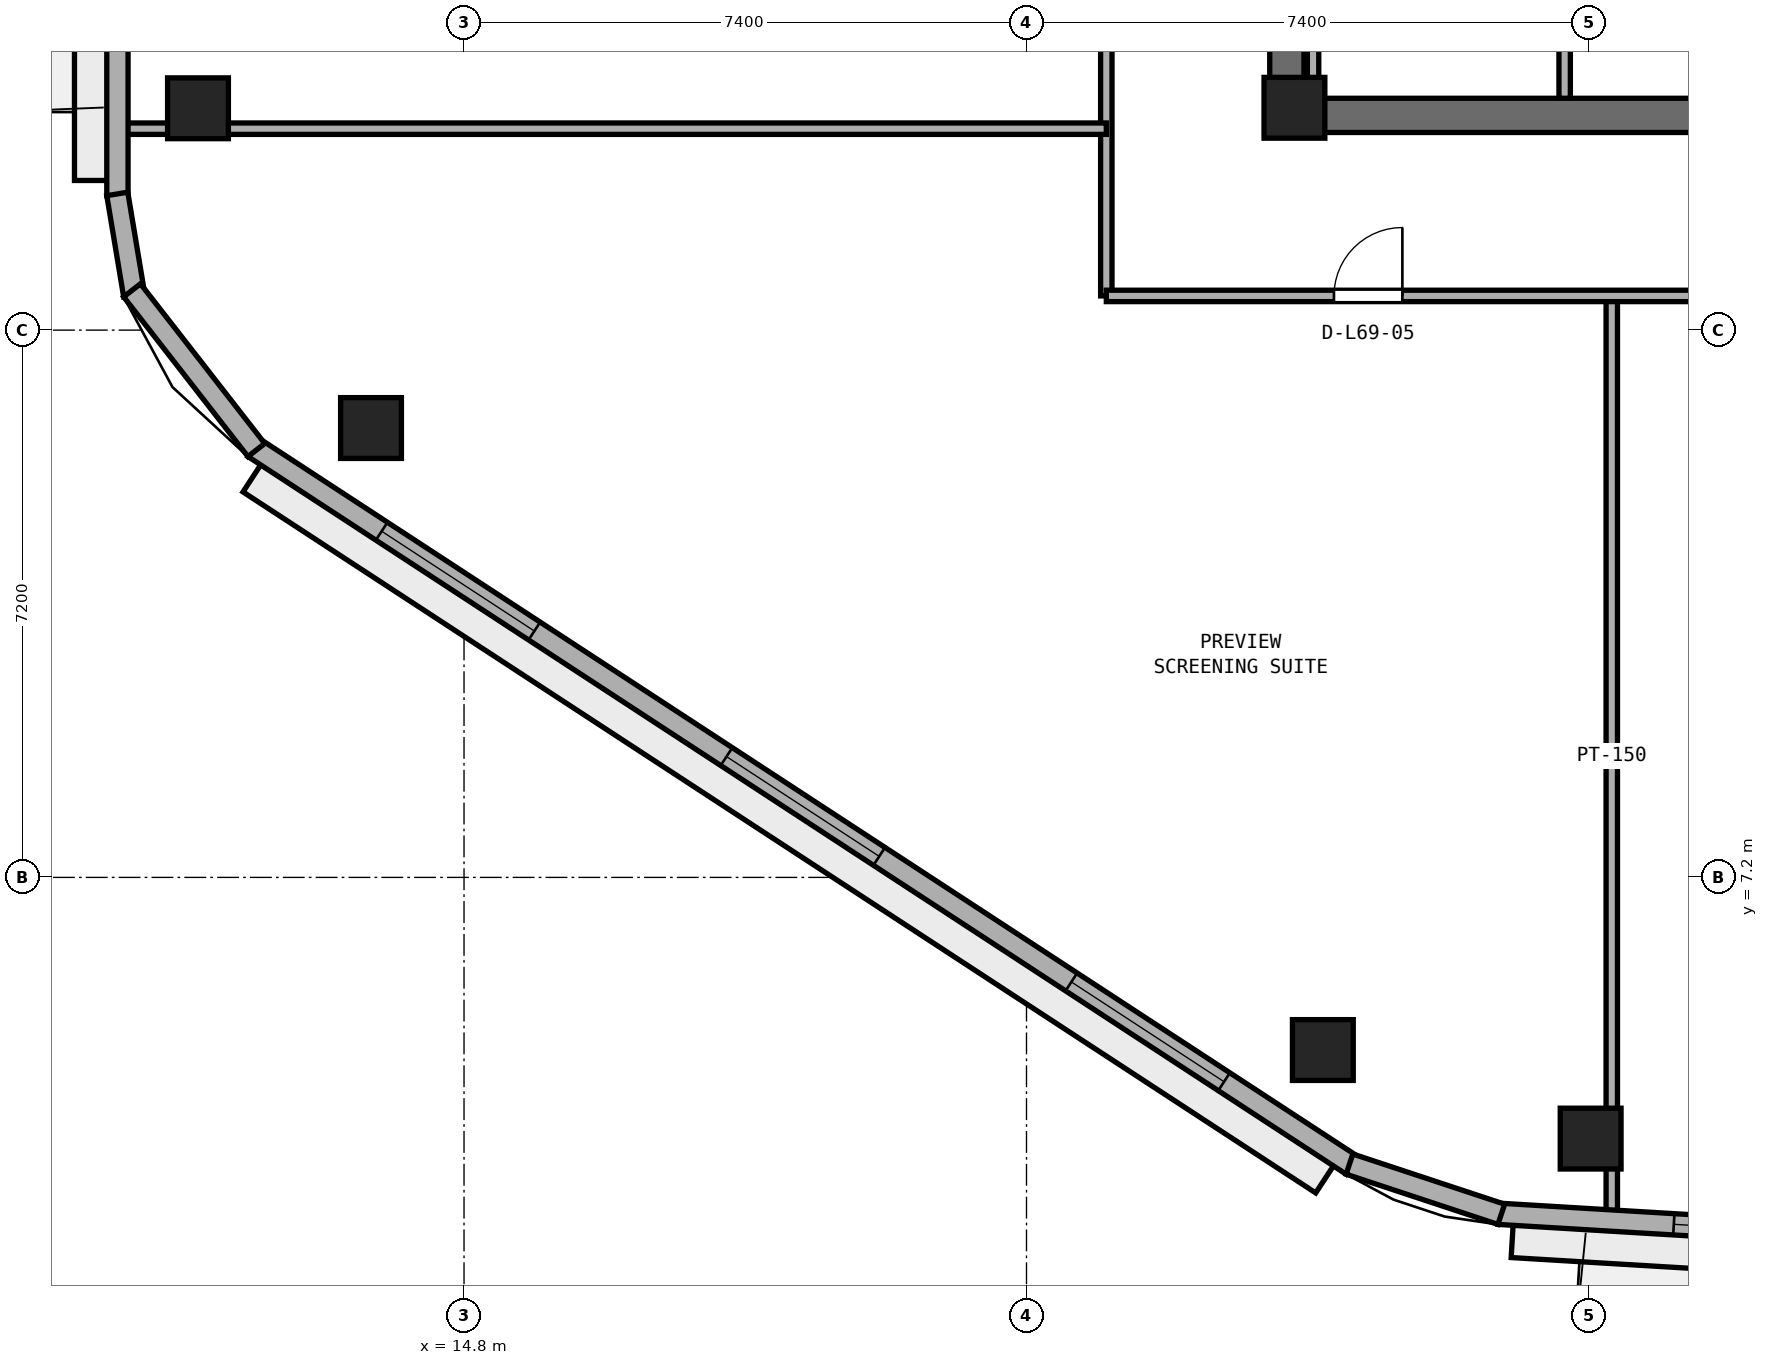
"""IFC4 building model, lengths in metres.
Left out: names, types, materials, properties, quantities, classifications, styles, units other than length and angle.
Written with IfcOpenShell. Run it as: python <this file> out.ifc"""

import sys

from ifc_helpers import new_model, si_unit, direction, frame, frame_2d, origin, origin_2d, place, context, subcontext, project, spatial, rectangle, extrude, element, fill, save


model = new_model("IFC4")
c1 = context("Model", 3, precision=1e-05, world=origin(), true_north=direction((0.0, 1.0)))
c2 = subcontext(c1, "Body", "Model", "MODEL_VIEW")
j1 = project(units=[si_unit("LENGTHUNIT", "METRE"), si_unit("PLANEANGLEUNIT", "RADIAN")], contexts=[c1])
p1 = place(None, origin())
s1 = spatial("IfcSite", under=j1, at=p1, CompositionType="ELEMENT")
p2 = place(p1, origin())
s2 = spatial("IfcBuilding", under=s1, at=p2, CompositionType="ELEMENT")
p3 = place(p2, frame((0.0, 0.0, 270.6)))
s3 = spatial("IfcBuildingStorey", under=s2, at=p3, CompositionType="ELEMENT", Elevation=270.6)
p4 = place(p3, frame((25.4, 17.225, 0.0), z_axis=(0.0, 0.0, 1.0), x_axis=(1.0, 0.0, 0.0)))
e1 = element("IfcWall", 1, at=p4, inside=s3, PredefinedType="SHEAR", context=c2, shape_type="SweptSolid", body=[
    extrude(rectangle(XDim=23.2, YDim=0.45, at=frame_2d((11.6, 0.0))), origin(), (0.0, 0.0, 1.0), 3.54),
])
p5 = place(p3, frame((25.625, 17.45, 0.0), z_axis=(0.0, 0.0, 1.0), x_axis=(0.0, 1.0, 0.0)))
e2 = element("IfcWall", 2, at=p5, inside=s3, PredefinedType="SHEAR", context=c2, shape_type="SweptSolid", body=[
    extrude(rectangle(XDim=15.5, YDim=0.45, at=frame_2d((7.75, 0.0))), origin(), (0.0, 0.0, 1.0), 3.54),
])
p6 = place(p5, frame((7.0, 0.0, 0.0)))
e3 = element("IfcOpeningElement", 3, at=p6, cuts=e2, PredefinedType="OPENING", context=c2, shape_type="SweptSolid", body=[
    extrude(rectangle(XDim=1.5, YDim=2.15, at=frame_2d((0.75, 1.075))), frame((0.0, 0.235, 0.0), z_axis=(0.0, -1.0, 0.0), x_axis=(1.0, 0.0, 0.0)), (0.0, 0.0, 1.0), 0.47),
])
p7 = place(p3, frame((25.725, 17.325, 0.0), z_axis=(0.0, 0.0, 1.0), x_axis=(1.0, 0.0, 0.0)))
e4 = element("IfcColumn", 4, at=p7, inside=s3, PredefinedType="PILASTER", context=c2, shape_type="SweptSolid", body=[
    extrude(rectangle(XDim=0.8, YDim=0.8, at=origin_2d()), origin(), (0.0, 0.0, 1.0), 3.8),
])
for number, where, z_axis, x_axis in (
    (5, (29.622, 3.764, 0.0), (0.0, 0.0, 1.0), (1.0, 0.0, 0.0)),
    (6, (11.3, 17.319, 0.0), (0.0, 0.0, 1.0), (1.0, 0.0, 0.0)),
    (7, (13.576, 13.112, 0.0), (0.0, 0.0, 1.0), (1.0, 0.0, 0.0)),
    (8, (26.099, 4.929, 0.0), (0.0, 0.0, 1.0), (1.0, 0.0, 0.0)),
):
    element("IfcColumn", number, at=place(p3, frame(where, z_axis=z_axis, x_axis=x_axis)), inside=s3, PredefinedType="COLUMN", context=c2, shape_type="SweptSolid", body=[
        extrude(rectangle(XDim=0.8, YDim=0.8, at=origin_2d()), origin(), (0.0, 0.0, 1.0), 3.8),
    ])
p8 = place(p3, frame((25.97, 17.45, 0.0), z_axis=(0.0, 0.0, 1.0), x_axis=(0.0, 1.0, 0.0)))
e9 = element("IfcWall", 9, at=p8, inside=s3, PredefinedType="PARTITIONING", context=c2, shape_type="SweptSolid", body=[
    extrude(rectangle(XDim=2.3, YDim=0.15, at=frame_2d((1.15, 0.0))), origin(), (0.0, 0.0, 1.0), 2.64),
])
p9 = place(p3, frame((29.28, 17.45, 0.0), z_axis=(0.0, 0.0, 1.0), x_axis=(0.0, 1.0, 0.0)))
e10 = element("IfcWall", 10, at=p9, inside=s3, PredefinedType="PARTITIONING", context=c2, shape_type="SweptSolid", body=[
    extrude(rectangle(XDim=2.3, YDim=0.15, at=frame_2d((1.15, 0.0))), origin(), (0.0, 0.0, 1.0), 3.54),
])
p10 = place(p3, frame((29.9, 2.75, 0.0), z_axis=(0.0, 0.0, 1.0), x_axis=(0.0, 1.0, 0.0)))
e11 = element("IfcWall", 11, at=p10, inside=s3, PredefinedType="PARTITIONING", context=c2, shape_type="SweptSolid", body=[
    extrude(rectangle(XDim=12.1, YDim=0.15, at=frame_2d((6.05, 0.0))), origin(), (0.0, 0.0, 1.0), 3.54),
])
p11 = place(p3, frame((23.25, 14.85, 0.0), z_axis=(0.0, 0.0, 1.0), x_axis=(0.0, 1.0, 0.0)))
e12 = element("IfcWall", 12, at=p11, inside=s3, PredefinedType="PARTITIONING", context=c2, shape_type="SweptSolid", body=[
    extrude(rectangle(XDim=20.7, YDim=0.15, at=frame_2d((10.35, 0.0))), origin(), (0.0, 0.0, 1.0), 3.54),
])
p12 = place(p11, frame((9.9, 0.0, 0.0)))
e13 = element("IfcOpeningElement", 13, at=p12, cuts=e12, PredefinedType="OPENING", context=c2, shape_type="SweptSolid", body=[
    extrude(rectangle(XDim=0.9, YDim=2.1, at=frame_2d((0.45, 1.05))), frame((0.0, 0.085, 0.0), z_axis=(0.0, -1.0, 0.0), x_axis=(1.0, 0.0, 0.0)), (0.0, 0.0, 1.0), 0.17),
])
p13 = place(p3, frame((23.25, 14.85, 0.0), z_axis=(0.0, 0.0, 1.0), x_axis=(1.0, 0.0, 0.0)))
e14 = element("IfcWall", 14, at=p13, inside=s3, PredefinedType="PARTITIONING", context=c2, shape_type="SweptSolid", body=[
    extrude(rectangle(XDim=25.35, YDim=0.15, at=frame_2d((12.675, 0.0))), origin(), (0.0, 0.0, 1.0), 3.54),
])
p14 = place(p13, frame((2.995, 0.0, 0.0)))
e15 = element("IfcOpeningElement", 15, at=p14, cuts=e14, PredefinedType="OPENING", context=c2, shape_type="SweptSolid", body=[
    extrude(rectangle(XDim=0.9, YDim=2.1, at=frame_2d((0.45, 1.05))), frame((0.0, 0.085, 0.0), z_axis=(0.0, -1.0, 0.0), x_axis=(1.0, 0.0, 0.0)), (0.0, 0.0, 1.0), 0.17),
])
p15 = place(p13, frame((11.95, 0.0, 0.0)))
e16 = element("IfcOpeningElement", 16, at=p15, cuts=e14, PredefinedType="OPENING", context=c2, shape_type="SweptSolid", body=[
    extrude(rectangle(XDim=0.9, YDim=2.1, at=frame_2d((0.45, 1.05))), frame((0.0, 0.085, 0.0), z_axis=(0.0, -1.0, 0.0), x_axis=(1.0, 0.0, 0.0)), (0.0, 0.0, 1.0), 0.17),
])
p16 = place(p13, frame((21.18, 0.0, 0.0)))
e17 = element("IfcOpeningElement", 17, at=p16, cuts=e14, PredefinedType="OPENING", context=c2, shape_type="SweptSolid", body=[
    extrude(rectangle(XDim=0.9, YDim=2.1, at=frame_2d((0.45, 1.05))), frame((0.0, 0.085, 0.0), z_axis=(0.0, -1.0, 0.0), x_axis=(1.0, 0.0, 0.0)), (0.0, 0.0, 1.0), 0.17),
])
p17 = place(p3, frame((10.305, 17.05, 0.0), z_axis=(0.0, 0.0, 1.0), x_axis=(1.0, 0.0, 0.0)))
e18 = element("IfcWall", 18, at=p17, inside=s3, PredefinedType="PARTITIONING", context=c2, shape_type="SweptSolid", body=[
    extrude(rectangle(XDim=12.945, YDim=0.15, at=frame_2d((6.473, 0.0))), origin(), (0.0, 0.0, 1.0), 2.19),
])
p18 = place(p3, frame((28.411, 2.774, 0.0), z_axis=(0.0, 0.0, 1.0), x_axis=(0.998203068368, -0.059921901676, 0.0)))
e19 = element("IfcWall", 19, at=p18, inside=s3, PredefinedType="STANDARD", context=c2, shape_type="SweptSolid", body=[
    extrude(rectangle(XDim=19.06, YDim=0.28, at=frame_2d((9.53, 0.0))), origin(), (0.0, 0.0, 1.0), 3.54),
])
p19 = place(p18, frame((8.98, 0.0, 0.0)))
e20 = element("IfcOpeningElement", 20, at=p19, cuts=e19, PredefinedType="OPENING", context=c2, shape_type="SweptSolid", body=[
    extrude(rectangle(XDim=1.1, YDim=2.2, at=frame_2d((0.55, 1.1))), frame((0.0, 0.15, 0.0), z_axis=(0.0, -1.0, 0.0), x_axis=(1.0, 0.0, 0.0)), (0.0, 0.0, 1.0), 0.3),
])
p20 = place(p18, frame((2.31, 0.0, 0.9)))
e21 = element("IfcOpeningElement", 21, at=p20, cuts=e19, PredefinedType="OPENING", context=c2, shape_type="SweptSolid", body=[
    extrude(rectangle(XDim=2.4, YDim=1.75, at=frame_2d((1.2, 0.875))), frame((0.0, 0.15, 0.0), z_axis=(0.0, -1.0, 0.0), x_axis=(1.0, 0.0, 0.0)), (0.0, 0.0, 1.0), 0.3),
])
p21 = place(p18, frame((14.35, 0.0, 0.9)))
e22 = element("IfcOpeningElement", 22, at=p21, cuts=e19, PredefinedType="OPENING", context=c2, shape_type="SweptSolid", body=[
    extrude(rectangle(XDim=2.4, YDim=1.75, at=frame_2d((1.2, 0.875))), frame((0.0, 0.15, 0.0), z_axis=(0.0, -1.0, 0.0), x_axis=(1.0, 0.0, 0.0)), (0.0, 0.0, 1.0), 0.3),
])
p22 = place(p3, frame((10.24, 33.425, 0.0), z_axis=(0.0, 0.0, 1.0), x_axis=(0.0, -1.0, 0.0)))
e23 = element("IfcWall", 23, at=p22, inside=s3, PredefinedType="STANDARD", context=c2, shape_type="SweptSolid", body=[
    extrude(rectangle(XDim=17.257, YDim=0.28, at=frame_2d((8.628, 0.0))), origin(), (0.0, 0.0, 1.0), 3.54),
])
p23 = place(p22, frame((8.078, 0.0, 0.0)))
e24 = element("IfcOpeningElement", 24, at=p23, cuts=e23, PredefinedType="OPENING", context=c2, shape_type="SweptSolid", body=[
    extrude(rectangle(XDim=1.1, YDim=2.2, at=frame_2d((0.55, 1.1))), frame((0.0, 0.15, 0.0), z_axis=(0.0, -1.0, 0.0), x_axis=(1.0, 0.0, 0.0)), (0.0, 0.0, 1.0), 0.3),
])
p24 = place(p22, frame((2.01, 0.0, 0.9)))
e25 = element("IfcOpeningElement", 25, at=p24, cuts=e23, PredefinedType="OPENING", context=c2, shape_type="SweptSolid", body=[
    extrude(rectangle(XDim=2.4, YDim=1.75, at=frame_2d((1.2, 0.875))), frame((0.0, 0.15, 0.0), z_axis=(0.0, -1.0, 0.0), x_axis=(1.0, 0.0, 0.0)), (0.0, 0.0, 1.0), 0.3),
])
p25 = place(p22, frame((12.847, 0.0, 0.9)))
e26 = element("IfcOpeningElement", 26, at=p25, cuts=e23, PredefinedType="OPENING", context=c2, shape_type="SweptSolid", body=[
    extrude(rectangle(XDim=2.4, YDim=1.75, at=frame_2d((1.2, 0.875))), frame((0.0, 0.15, 0.0), z_axis=(0.0, -1.0, 0.0), x_axis=(1.0, 0.0, 0.0)), (0.0, 0.0, 1.0), 0.3),
])
p26 = place(p3, frame((12.034, 12.854, 0.0), z_axis=(0.0, 0.0, 1.0), x_axis=(0.837118352984, -0.547021812269, 0.0)))
e27 = element("IfcWall", 27, at=p26, inside=s3, PredefinedType="STANDARD", context=c2, shape_type="SweptSolid", body=[
    extrude(rectangle(XDim=17.259, YDim=0.28, at=frame_2d((8.63, 0.0))), origin(), (0.0, 0.0, 1.0), 3.54),
])
p27 = place(p26, frame((2.01, 0.0, 0.9)))
e28 = element("IfcOpeningElement", 28, at=p27, cuts=e27, PredefinedType="OPENING", context=c2, shape_type="SweptSolid", body=[
    extrude(rectangle(XDim=2.4, YDim=1.75, at=frame_2d((1.2, 0.875))), frame((0.0, 0.15, 0.0), z_axis=(0.0, -1.0, 0.0), x_axis=(1.0, 0.0, 0.0)), (0.0, 0.0, 1.0), 0.3),
])
p28 = place(p26, frame((7.43, 0.0, 0.9)))
e29 = element("IfcOpeningElement", 29, at=p28, cuts=e27, PredefinedType="OPENING", context=c2, shape_type="SweptSolid", body=[
    extrude(rectangle(XDim=2.4, YDim=1.75, at=frame_2d((1.2, 0.875))), frame((0.0, 0.15, 0.0), z_axis=(0.0, -1.0, 0.0), x_axis=(1.0, 0.0, 0.0)), (0.0, 0.0, 1.0), 0.3),
])
p29 = place(p26, frame((12.849, 0.0, 0.9)))
e30 = element("IfcOpeningElement", 30, at=p29, cuts=e27, PredefinedType="OPENING", context=c2, shape_type="SweptSolid", body=[
    extrude(rectangle(XDim=2.4, YDim=1.75, at=frame_2d((1.2, 0.875))), frame((0.0, 0.15, 0.0), z_axis=(0.0, -1.0, 0.0), x_axis=(1.0, 0.0, 0.0)), (0.0, 0.0, 1.0), 0.3),
])
p30 = place(p3, frame((10.238, 16.192, 0.0), z_axis=(0.0, 0.0, 1.0), x_axis=(0.164604311367, -0.986359681191, 0.0)))
e31 = element("IfcWall", 31, at=p30, inside=s3, PredefinedType="STANDARD", context=c2, shape_type="SweptSolid", body=[
    extrude(rectangle(XDim=1.35, YDim=0.28, at=frame_2d((0.675, 0.0))), origin(), (0.0, 0.0, 1.0), 3.54),
])
p31 = place(p3, frame((10.433, 14.923, 0.0), z_axis=(0.0, 0.0, 1.0), x_axis=(0.614181852676, -0.78916452774, 0.0)))
e32 = element("IfcWall", 32, at=p31, inside=s3, PredefinedType="STANDARD", context=c2, shape_type="SweptSolid", body=[
    extrude(rectangle(XDim=2.662, YDim=0.28, at=frame_2d((1.331, 0.0))), origin(), (0.0, 0.0, 1.0), 3.54),
])
p32 = place(p3, frame((26.449, 3.428, 0.0), z_axis=(0.0, 0.0, 1.0), x_axis=(0.949435039229, -0.313963542923, 0.0)))
e33 = element("IfcWall", 33, at=p32, inside=s3, PredefinedType="STANDARD", context=c2, shape_type="SweptSolid", body=[
    extrude(rectangle(XDim=2.104, YDim=0.28, at=frame_2d((1.052, 0.0))), origin(), (0.0, 0.0, 1.0), 3.54),
])
p33 = place(p14, origin())
e34 = element("IfcDoor", 34, at=p33, inside=s3, OperationType="SINGLE_SWING_RIGHT", PredefinedType="DOOR", context=c2, shape_type="SweptSolid", body=[
    extrude(rectangle(XDim=0.9, YDim=2.1, at=frame_2d((0.45, 1.05))), frame((0.0, 0.025, 0.0), z_axis=(0.0, -1.0, 0.0), x_axis=(1.0, 0.0, 0.0)), (0.0, 0.0, 1.0), 0.05),
])
fill(e15, e34)
p34 = place(p20, origin())
e35 = element("IfcWindow", 35, at=p34, inside=s3, PartitioningType="SINGLE_PANEL", PredefinedType="WINDOW", context=c2, shape_type="SweptSolid", body=[
    extrude(rectangle(XDim=2.4, YDim=1.75, at=frame_2d((1.2, 0.875))), frame((0.0, 0.03, 0.0), z_axis=(0.0, -1.0, 0.0), x_axis=(1.0, 0.0, 0.0)), (0.0, 0.0, 1.0), 0.06),
])
fill(e21, e35)
p35 = place(p27, origin())
e36 = element("IfcWindow", 36, at=p35, inside=s3, PartitioningType="SINGLE_PANEL", PredefinedType="WINDOW", context=c2, shape_type="SweptSolid", body=[
    extrude(rectangle(XDim=2.4, YDim=1.75, at=frame_2d((1.2, 0.875))), frame((0.0, 0.03, 0.0), z_axis=(0.0, -1.0, 0.0), x_axis=(1.0, 0.0, 0.0)), (0.0, 0.0, 1.0), 0.06),
])
fill(e28, e36)
p36 = place(p28, origin())
e37 = element("IfcWindow", 37, at=p36, inside=s3, PartitioningType="SINGLE_PANEL", PredefinedType="WINDOW", context=c2, shape_type="SweptSolid", body=[
    extrude(rectangle(XDim=2.4, YDim=1.75, at=frame_2d((1.2, 0.875))), frame((0.0, 0.03, 0.0), z_axis=(0.0, -1.0, 0.0), x_axis=(1.0, 0.0, 0.0)), (0.0, 0.0, 1.0), 0.06),
])
fill(e29, e37)
p37 = place(p29, origin())
e38 = element("IfcWindow", 38, at=p37, inside=s3, PartitioningType="SINGLE_PANEL", PredefinedType="WINDOW", context=c2, shape_type="SweptSolid", body=[
    extrude(rectangle(XDim=2.4, YDim=1.75, at=frame_2d((1.2, 0.875))), frame((0.0, 0.03, 0.0), z_axis=(0.0, -1.0, 0.0), x_axis=(1.0, 0.0, 0.0)), (0.0, 0.0, 1.0), 0.06),
])
fill(e30, e38)
save(model, sys.argv[1])
